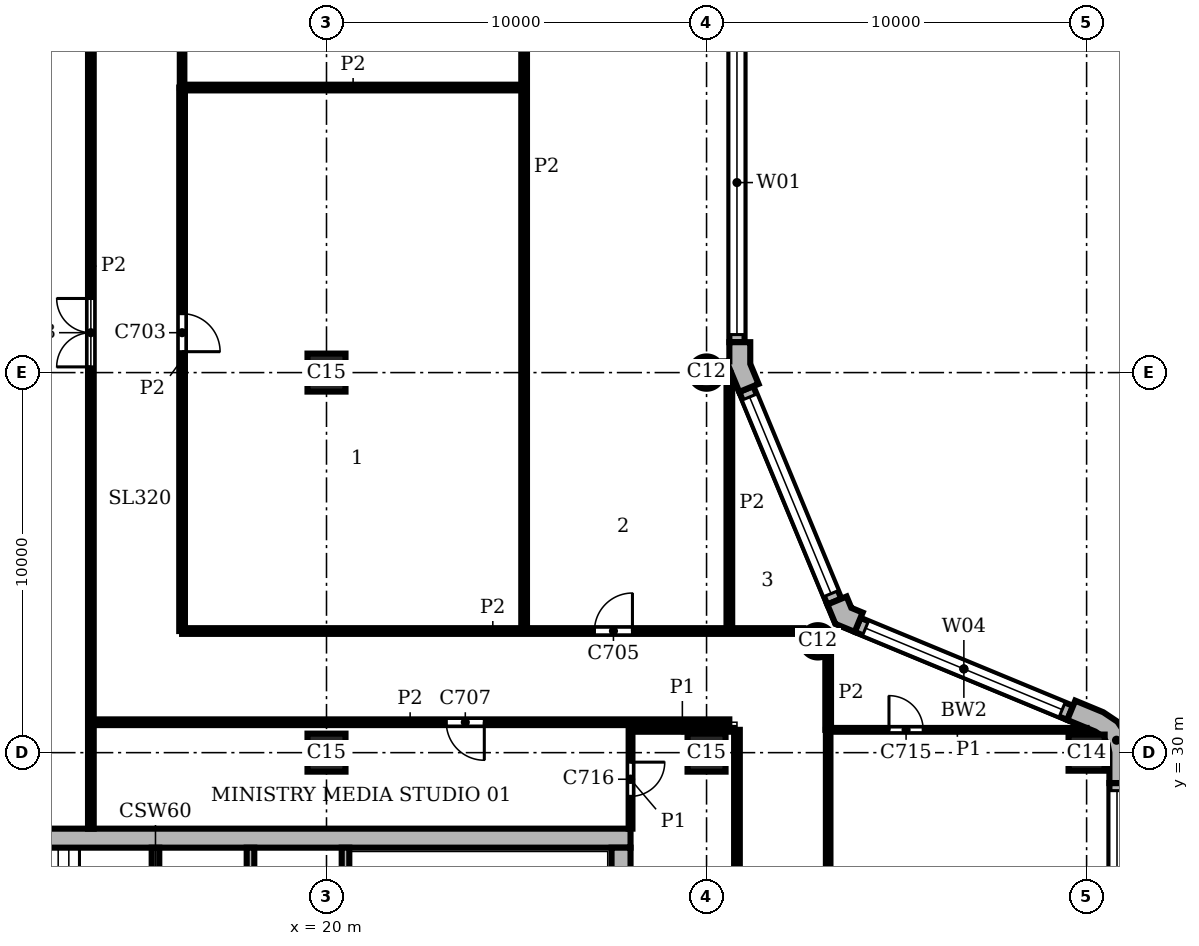
"""IFC4 building model, lengths in metres.
Left out: names, types, materials, properties, quantities, classifications, styles, units other than length and angle.
Written with IfcOpenShell. Run it as: python <this file> out.ifc"""

import sys

from ifc_helpers import new_model, si_unit, direction, frame, frame_2d, origin, origin_2d, place, context, subcontext, project, spatial, polyline, rectangle, circle, outline, extrude, element, fill, save


model = new_model("IFC4")
c1 = context("Model", 3, precision=1e-05, world=origin(), true_north=direction((0.0, 1.0)))
c2 = subcontext(c1, "Body", "Model", "MODEL_VIEW")
j1 = project(units=[si_unit("LENGTHUNIT", "METRE"), si_unit("PLANEANGLEUNIT", "RADIAN")], contexts=[c1])
p1 = place(None, origin())
s1 = spatial("IfcSite", under=j1, at=p1, CompositionType="ELEMENT")
p2 = place(p1, origin())
s2 = spatial("IfcBuilding", under=s1, at=p2, CompositionType="ELEMENT")
p3 = place(p2, frame((0.0, 0.0, 309.9)))
s3 = spatial("IfcBuildingStorey", under=s2, at=p3, CompositionType="ELEMENT", Elevation=309.9)
p4 = place(p3, frame((40.0, 30.0, 0.0), z_axis=(0.0, 0.0, 1.0), x_axis=(1.0, 0.0, 0.0)))
e1 = element("IfcColumn", 1, at=p4, inside=s3, PredefinedType="COLUMN", context=c2, shape_type="SweptSolid", body=[
    extrude(rectangle(XDim=0.95, YDim=0.95, at=origin_2d()), origin(), (0.0, 0.0, 1.0), 3.9),
])
for number, where, z_axis, x_axis in (
    (2, (32.929, 32.929, 0.0), (0.0, 0.0, 1.0), (1.0, 0.0, 0.0)),
    (3, (30.0, 40.0, 0.0), (0.0, 0.0, 1.0), (1.0, 0.0, 0.0)),
):
    element("IfcColumn", number, at=place(p3, frame(where, z_axis=z_axis, x_axis=x_axis)), inside=s3, PredefinedType="COLUMN", context=c2, shape_type="SweptSolid", body=[
        extrude(circle(Radius=0.425, at=origin_2d()), origin(), (0.0, 0.0, 1.0), 3.9),
    ])
for number, where, z_axis, x_axis in (
    (4, (20.0, 30.0, 0.0), (0.0, 0.0, 1.0), (1.0, 0.0, 0.0)),
    (5, (20.0, 40.0, 0.0), (0.0, 0.0, 1.0), (1.0, 0.0, 0.0)),
    (6, (30.0, 30.0, 0.0), (0.0, 0.0, 1.0), (1.0, 0.0, 0.0)),
):
    element("IfcColumn", number, at=place(p3, frame(where, z_axis=z_axis, x_axis=x_axis)), inside=s3, PredefinedType="COLUMN", context=c2, shape_type="SweptSolid", body=[
        extrude(rectangle(XDim=1.0, YDim=1.0, at=origin_2d()), origin(), (0.0, 0.0, 1.0), 3.9),
    ])
p5 = place(p3, frame((27.75, 8.5, 0.0), z_axis=(0.0, 0.0, 1.0), x_axis=(0.0, 1.0, 0.0)))
e7 = element("IfcWall", 7, at=p5, inside=s3, PredefinedType="SHEAR", context=c2, shape_type="SweptSolid", body=[
    extrude(rectangle(XDim=19.0, YDim=0.5, at=frame_2d((9.5, 0.0))), origin(), (0.0, 0.0, 1.0), 3.9),
])
p6 = place(p5, frame((4.95, 0.0, 0.0)))
e8 = element("IfcOpeningElement", 8, at=p6, cuts=e7, PredefinedType="OPENING", context=c2, shape_type="SweptSolid", body=[
    extrude(rectangle(XDim=1.6, YDim=2.1, at=frame_2d((0.8, 1.05))), frame((0.0, 0.26, 0.0), z_axis=(0.0, -1.0, 0.0), x_axis=(1.0, 0.0, 0.0)), (0.0, 0.0, 1.0), 0.52),
])
p7 = place(p3, frame((28.0, 27.75, 0.0), z_axis=(0.0, 0.0, 1.0), x_axis=(-1.0, 0.0, 0.0)))
e9 = element("IfcWall", 9, at=p7, inside=s3, PredefinedType="SHEAR", context=c2, shape_type="SweptSolid", body=[
    extrude(rectangle(XDim=20.0, YDim=0.5, at=frame_2d((10.0, 0.0))), origin(), (0.0, 0.0, 1.0), 3.9),
])
p8 = place(p3, origin())
e10 = element("IfcWall", 10, at=p8, inside=s3, PredefinedType="SOLIDWALL", context=c2, shape_type="SweptSolid", body=[
    extrude(outline(polyline([(41.0, 29.2), (41.15, 29.2), (41.15, 30.0), (41.062, 30.44), (40.813, 30.813), (40.44, 31.062), (39.701, 31.369), (39.644, 31.23), (39.49, 30.861), (40.229, 30.554), (40.424, 30.424), (40.554, 30.229), (40.6, 30.0), (40.6, 29.2), (41.0, 29.2)])), origin(), (0.0, 0.0, 1.0), 3.9),
])
e11 = element("IfcWall", 11, at=p8, inside=s3, PredefinedType="SOLIDWALL", context=c2, shape_type="SweptSolid", body=[
    extrude(outline(polyline([(34.051, 33.547), (34.108, 33.685), (33.809, 33.809), (33.685, 34.108), (33.547, 34.051), (33.177, 33.898), (33.388, 33.388), (33.898, 33.177), (34.051, 33.547)])), origin(), (0.0, 0.0, 1.0), 3.9),
])
e12 = element("IfcWall", 12, at=p8, inside=s3, PredefinedType="SOLIDWALL", context=c2, shape_type="SweptSolid", body=[
    extrude(outline(polyline([(30.62, 39.995), (30.62, 40.071), (30.861, 39.49), (31.23, 39.644), (31.369, 39.701), (31.15, 40.229), (31.15, 40.8), (31.0, 40.8), (30.6, 40.8), (30.6, 40.295), (30.425, 40.295), (30.425, 39.995), (30.62, 39.995)])), origin(), (0.0, 0.0, 1.0), 3.9),
])
p9 = place(p3, frame((40.8, 0.8, 0.0), z_axis=(0.0, 0.0, 1.0), x_axis=(0.0, 1.0, 0.0)))
e13 = element("IfcWall", 13, at=p9, inside=s3, PredefinedType="SOLIDWALL", context=c2, shape_type="SweptSolid", body=[
    extrude(rectangle(XDim=28.4, YDim=0.4, at=frame_2d((14.2, 0.0))), origin(), (0.0, 0.0, 1.0), 3.9),
])
p10 = place(p9, frame((0.2, 0.0, 0.9)))
e14 = element("IfcOpeningElement", 14, at=p10, cuts=e13, PredefinedType="OPENING", context=c2, shape_type="SweptSolid", body=[
    extrude(rectangle(XDim=8.0, YDim=2.35, at=frame_2d((4.0, 1.175))), frame((0.0, 0.21, 0.0), z_axis=(0.0, -1.0, 0.0), x_axis=(1.0, 0.0, 0.0)), (0.0, 0.0, 1.0), 0.42),
])
p11 = place(p9, frame((10.2, 0.0, 0.9)))
e15 = element("IfcOpeningElement", 15, at=p11, cuts=e13, PredefinedType="OPENING", context=c2, shape_type="SweptSolid", body=[
    extrude(rectangle(XDim=8.0, YDim=2.35, at=frame_2d((4.0, 1.175))), frame((0.0, 0.21, 0.0), z_axis=(0.0, -1.0, 0.0), x_axis=(1.0, 0.0, 0.0)), (0.0, 0.0, 1.0), 0.42),
])
p12 = place(p9, frame((20.2, 0.0, 0.9)))
e16 = element("IfcOpeningElement", 16, at=p12, cuts=e13, PredefinedType="OPENING", context=c2, shape_type="SweptSolid", body=[
    extrude(rectangle(XDim=8.0, YDim=2.35, at=frame_2d((4.0, 1.175))), frame((0.0, 0.21, 0.0), z_axis=(0.0, -1.0, 0.0), x_axis=(1.0, 0.0, 0.0)), (0.0, 0.0, 1.0), 0.42),
])
p13 = place(p3, frame((39.567, 31.045, 0.0), z_axis=(0.0, 0.0, 1.0), x_axis=(-0.923891000409, 0.382655745237, 0.0)))
e17 = element("IfcWall", 17, at=p13, inside=s3, PredefinedType="SOLIDWALL", context=c2, shape_type="SweptSolid", body=[
    extrude(rectangle(XDim=6.053, YDim=0.4, at=frame_2d((3.027, 0.0))), origin(), (0.0, 0.0, 1.0), 3.9),
])
p14 = place(p13, frame((0.227, 0.0, 0.9)))
e18 = element("IfcOpeningElement", 18, at=p14, cuts=e17, PredefinedType="OPENING", context=c2, shape_type="SweptSolid", body=[
    extrude(rectangle(XDim=5.6, YDim=2.35, at=frame_2d((2.8, 1.175))), frame((0.0, 0.21, 0.0), z_axis=(0.0, -1.0, 0.0), x_axis=(1.0, 0.0, 0.0)), (0.0, 0.0, 1.0), 0.42),
])
p15 = place(p3, frame((33.362, 33.974, 0.0), z_axis=(0.0, 0.0, 1.0), x_axis=(-0.382655745237, 0.923891000409, 0.0)))
e19 = element("IfcWall", 19, at=p15, inside=s3, PredefinedType="SOLIDWALL", context=c2, shape_type="SweptSolid", body=[
    extrude(rectangle(XDim=6.053, YDim=0.4, at=frame_2d((3.027, 0.0))), origin(), (0.0, 0.0, 1.0), 3.9),
])
p16 = place(p15, frame((0.227, 0.0, 0.9)))
e20 = element("IfcOpeningElement", 20, at=p16, cuts=e19, PredefinedType="OPENING", context=c2, shape_type="SweptSolid", body=[
    extrude(rectangle(XDim=5.6, YDim=2.35, at=frame_2d((2.8, 1.175))), frame((0.0, 0.21, 0.0), z_axis=(0.0, -1.0, 0.0), x_axis=(1.0, 0.0, 0.0)), (0.0, 0.0, 1.0), 0.42),
])
p17 = place(p3, frame((30.8, 40.8, 0.0), z_axis=(0.0, 0.0, 1.0), x_axis=(0.0, 1.0, 0.0)))
e21 = element("IfcWall", 21, at=p17, inside=s3, PredefinedType="SOLIDWALL", context=c2, shape_type="SweptSolid", body=[
    extrude(rectangle(XDim=18.4, YDim=0.4, at=frame_2d((9.2, 0.0))), origin(), (0.0, 0.0, 1.0), 3.9),
])
p18 = place(p17, frame((0.2, 0.0, 0.9)))
e22 = element("IfcOpeningElement", 22, at=p18, cuts=e21, PredefinedType="OPENING", context=c2, shape_type="SweptSolid", body=[
    extrude(rectangle(XDim=8.0, YDim=2.35, at=frame_2d((4.0, 1.175))), frame((0.0, 0.21, 0.0), z_axis=(0.0, -1.0, 0.0), x_axis=(1.0, 0.0, 0.0)), (0.0, 0.0, 1.0), 0.42),
])
p19 = place(p17, frame((10.2, 0.0, 0.9)))
e23 = element("IfcOpeningElement", 23, at=p19, cuts=e21, PredefinedType="OPENING", context=c2, shape_type="SweptSolid", body=[
    extrude(rectangle(XDim=8.0, YDim=2.35, at=frame_2d((4.0, 1.175))), frame((0.0, 0.21, 0.0), z_axis=(0.0, -1.0, 0.0), x_axis=(1.0, 0.0, 0.0)), (0.0, 0.0, 1.0), 0.42),
])
p20 = place(p3, frame((15.5, 23.6, 0.0), z_axis=(0.0, 0.0, 1.0), x_axis=(0.0, 1.0, 0.0)))
e24 = element("IfcWall", 24, at=p20, inside=s3, PredefinedType="SHEAR", context=c2, shape_type="SweptSolid", body=[
    extrude(rectangle(XDim=3.9, YDim=0.2, at=frame_2d((1.95, 0.0))), origin(), (0.0, 0.0, 1.0), 3.58),
])
p21 = place(p3, frame((18.0, 20.0, 0.0), z_axis=(0.0, 0.0, 1.0), x_axis=(0.0, 1.0, 0.0)))
e25 = element("IfcWall", 25, at=p21, inside=s3, PredefinedType="SHEAR", context=c2, shape_type="SweptSolid", body=[
    extrude(rectangle(XDim=7.5, YDim=0.2, at=frame_2d((3.75, 0.0))), origin(), (0.0, 0.0, 1.0), 3.58),
])
p22 = place(p21, frame((1.2, 0.0, 0.0)))
e26 = element("IfcOpeningElement", 26, at=p22, cuts=e25, PredefinedType="OPENING", context=c2, shape_type="SweptSolid", body=[
    extrude(rectangle(XDim=1.2, YDim=2.1, at=frame_2d((0.6, 1.05))), frame((0.0, 0.11, 0.0), z_axis=(0.0, -1.0, 0.0), x_axis=(1.0, 0.0, 0.0)), (0.0, 0.0, 1.0), 0.22),
])
p23 = place(p3, frame((20.5, 23.6, 0.0), z_axis=(0.0, 0.0, 1.0), x_axis=(0.0, 1.0, 0.0)))
e27 = element("IfcWall", 27, at=p23, inside=s3, PredefinedType="SHEAR", context=c2, shape_type="SweptSolid", body=[
    extrude(rectangle(XDim=3.9, YDim=0.2, at=frame_2d((1.95, 0.0))), origin(), (0.0, 0.0, 1.0), 3.58),
])
p24 = place(p3, frame((28.0, 28.0, 0.0), z_axis=(0.0, 0.0, 1.0), x_axis=(0.0, 1.0, 0.0)))
e28 = element("IfcWall", 28, at=p24, inside=s3, PredefinedType="PARTITIONING", context=c2, shape_type="SweptSolid", body=[
    extrude(rectangle(XDim=2.598, YDim=0.1, at=frame_2d((1.299, 0.0))), origin(), (0.0, 0.0, 1.0), 3.58),
])
p25 = place(p24, frame((0.85, 0.0, 0.0)))
e29 = element("IfcOpeningElement", 29, at=p25, cuts=e28, PredefinedType="OPENING", context=c2, shape_type="SweptSolid", body=[
    extrude(rectangle(XDim=0.9, YDim=2.1, at=frame_2d((0.45, 1.05))), frame((0.0, 0.06, 0.0), z_axis=(0.0, -1.0, 0.0), x_axis=(1.0, 0.0, 0.0)), (0.0, 0.0, 1.0), 0.12),
])
p26 = place(p3, frame((28.002, 30.6, 0.0), z_axis=(0.0, 0.0, 1.0), x_axis=(1.0, 0.0, 0.0)))
e30 = element("IfcWall", 30, at=p26, inside=s3, PredefinedType="PARTITIONING", context=c2, shape_type="SweptSolid", body=[
    extrude(rectangle(XDim=2.723, YDim=0.1, at=frame_2d((1.362, 0.0))), origin(), (0.0, 0.0, 1.0), 3.58),
])
p27 = place(p3, frame((33.2, 30.6, 0.0), z_axis=(0.0, 0.0, 1.0), x_axis=(1.0, 0.0, 0.0)))
e31 = element("IfcWall", 31, at=p27, inside=s3, PredefinedType="PARTITIONING", context=c2, shape_type="SweptSolid", body=[
    extrude(rectangle(XDim=6.799, YDim=0.1, at=frame_2d((3.399, 0.0))), origin(), (0.0, 0.0, 1.0), 3.58),
])
p28 = place(p27, frame((1.6, 0.0, 0.0)))
e32 = element("IfcOpeningElement", 32, at=p28, cuts=e31, PredefinedType="OPENING", context=c2, shape_type="SweptSolid", body=[
    extrude(rectangle(XDim=0.9, YDim=2.1, at=frame_2d((0.45, 1.05))), frame((0.0, 0.06, 0.0), z_axis=(0.0, -1.0, 0.0), x_axis=(1.0, 0.0, 0.0)), (0.0, 0.0, 1.0), 0.12),
])
p29 = place(p3, frame((13.8, 28.0, 0.0), z_axis=(0.0, 0.0, 1.0), x_axis=(0.0, 1.0, 0.0)))
e33 = element("IfcWall", 33, at=p29, inside=s3, PredefinedType="PARTITIONING", context=c2, shape_type="SweptSolid", body=[
    extrude(rectangle(XDim=29.6, YDim=0.15, at=frame_2d((14.8, 0.0))), origin(), (0.0, 0.0, 1.0), 3.58),
])
p30 = place(p29, frame((12.15, 0.0, 0.0)))
e34 = element("IfcOpeningElement", 34, at=p30, cuts=e33, PredefinedType="OPENING", context=c2, shape_type="SweptSolid", body=[
    extrude(rectangle(XDim=1.8, YDim=2.1, at=frame_2d((0.9, 1.05))), frame((0.0, 0.085, 0.0), z_axis=(0.0, -1.0, 0.0), x_axis=(1.0, 0.0, 0.0)), (0.0, 0.0, 1.0), 0.17),
])
p31 = place(p3, frame((16.2, 33.2, 0.0), z_axis=(0.0, 0.0, 1.0), x_axis=(0.0, 1.0, 0.0)))
e35 = element("IfcWall", 35, at=p31, inside=s3, PredefinedType="PARTITIONING", context=c2, shape_type="SweptSolid", body=[
    extrude(rectangle(XDim=14.3, YDim=0.15, at=frame_2d((7.15, 0.0))), origin(), (0.0, 0.0, 1.0), 3.58),
])
p32 = place(p31, frame((7.35, 0.0, 0.0)))
e36 = element("IfcOpeningElement", 36, at=p32, cuts=e35, PredefinedType="OPENING", context=c2, shape_type="SweptSolid", body=[
    extrude(rectangle(XDim=1.0, YDim=2.1, at=frame_2d((0.5, 1.05))), frame((0.0, 0.085, 0.0), z_axis=(0.0, -1.0, 0.0), x_axis=(1.0, 0.0, 0.0)), (0.0, 0.0, 1.0), 0.17),
])
p33 = place(p3, frame((25.2, 33.2, 0.0), z_axis=(0.0, 0.0, 1.0), x_axis=(0.0, 1.0, 0.0)))
e37 = element("IfcWall", 37, at=p33, inside=s3, PredefinedType="PARTITIONING", context=c2, shape_type="SweptSolid", body=[
    extrude(rectangle(XDim=24.4, YDim=0.15, at=frame_2d((12.2, 0.0))), origin(), (0.0, 0.0, 1.0), 3.58),
])
p34 = place(p3, frame((30.6, 33.2, 0.0), z_axis=(0.0, 0.0, 1.0), x_axis=(0.0, 1.0, 0.0)))
e38 = element("IfcWall", 38, at=p34, inside=s3, PredefinedType="PARTITIONING", context=c2, shape_type="SweptSolid", body=[
    extrude(rectangle(XDim=6.738, YDim=0.15, at=frame_2d((3.369, 0.0))), origin(), (0.0, 0.0, 1.0), 3.58),
])
p35 = place(p3, frame((30.8, 15.45, 0.0), z_axis=(0.0, 0.0, 1.0), x_axis=(0.0, 1.0, 0.0)))
e39 = element("IfcWall", 39, at=p35, inside=s3, PredefinedType="PARTITIONING", context=c2, shape_type="SweptSolid", body=[
    extrude(rectangle(XDim=15.15, YDim=0.15, at=frame_2d((7.575, 0.0))), origin(), (0.0, 0.0, 1.0), 3.58),
])
p36 = place(p35, frame((5.35, 0.0, 0.0)))
e40 = element("IfcOpeningElement", 40, at=p36, cuts=e39, PredefinedType="OPENING", context=c2, shape_type="SweptSolid", body=[
    extrude(rectangle(XDim=1.0, YDim=2.1, at=frame_2d((0.5, 1.05))), frame((0.0, 0.085, 0.0), z_axis=(0.0, -1.0, 0.0), x_axis=(1.0, 0.0, 0.0)), (0.0, 0.0, 1.0), 0.17),
])
p37 = place(p3, frame((33.2, 30.6, 0.0), z_axis=(0.0, 0.0, 1.0), x_axis=(0.0, 1.0, 0.0)))
e41 = element("IfcWall", 41, at=p37, inside=s3, PredefinedType="PARTITIONING", context=c2, shape_type="SweptSolid", body=[
    extrude(rectangle(XDim=1.952, YDim=0.15, at=frame_2d((0.976, 0.0))), origin(), (0.0, 0.0, 1.0), 3.58),
])
p38 = place(p3, frame((13.802, 30.8, 0.0), z_axis=(0.0, 0.0, 1.0), x_axis=(1.0, 0.0, 0.0)))
e42 = element("IfcWall", 42, at=p38, inside=s3, PredefinedType="PARTITIONING", context=c2, shape_type="SweptSolid", body=[
    extrude(rectangle(XDim=16.797, YDim=0.15, at=frame_2d((8.398, 0.0))), origin(), (0.0, 0.0, 1.0), 3.58),
])
p39 = place(p38, frame((9.35, 0.0, 0.0)))
e43 = element("IfcOpeningElement", 43, at=p39, cuts=e42, PredefinedType="OPENING", context=c2, shape_type="SweptSolid", body=[
    extrude(rectangle(XDim=1.0, YDim=2.1, at=frame_2d((0.5, 1.05))), frame((0.0, 0.085, 0.0), z_axis=(0.0, -1.0, 0.0), x_axis=(1.0, 0.0, 0.0)), (0.0, 0.0, 1.0), 0.17),
])
p40 = place(p3, frame((16.2, 33.2, 0.0), z_axis=(0.0, 0.0, 1.0), x_axis=(1.0, 0.0, 0.0)))
e44 = element("IfcWall", 44, at=p40, inside=s3, PredefinedType="PARTITIONING", context=c2, shape_type="SweptSolid", body=[
    extrude(rectangle(XDim=16.352, YDim=0.15, at=frame_2d((8.176, 0.0))), origin(), (0.0, 0.0, 1.0), 3.58),
])
p41 = place(p40, frame((10.85, 0.0, 0.0)))
e45 = element("IfcOpeningElement", 45, at=p41, cuts=e44, PredefinedType="OPENING", context=c2, shape_type="SweptSolid", body=[
    extrude(rectangle(XDim=1.0, YDim=2.1, at=frame_2d((0.5, 1.05))), frame((0.0, 0.085, 0.0), z_axis=(0.0, -1.0, 0.0), x_axis=(1.0, 0.0, 0.0)), (0.0, 0.0, 1.0), 0.17),
])
p42 = place(p3, frame((16.2, 47.5, 0.0), z_axis=(0.0, 0.0, 1.0), x_axis=(1.0, 0.0, 0.0)))
e46 = element("IfcWall", 46, at=p42, inside=s3, PredefinedType="PARTITIONING", context=c2, shape_type="SweptSolid", body=[
    extrude(rectangle(XDim=9.0, YDim=0.15, at=frame_2d((4.5, 0.0))), origin(), (0.0, 0.0, 1.0), 3.58),
])
p43 = place(p3, frame((16.2, 47.5, 0.0), z_axis=(0.0, 0.0, 1.0), x_axis=(0.0, 1.0, 0.0)))
e47 = element("IfcWall", 47, at=p43, inside=s3, PredefinedType="PARTITIONING", context=c2, shape_type="SweptSolid", body=[
    extrude(rectangle(XDim=10.1, YDim=0.12, at=frame_2d((5.05, 0.0))), origin(), (0.0, 0.0, 1.0), 3.58),
])
p44 = place(p43, frame((3.35, 0.0, 0.0)))
e48 = element("IfcOpeningElement", 48, at=p44, cuts=e47, PredefinedType="OPENING", context=c2, shape_type="SweptSolid", body=[
    extrude(rectangle(XDim=1.8, YDim=2.1, at=frame_2d((0.9, 1.05))), frame((0.0, 0.07, 0.0), z_axis=(0.0, -1.0, 0.0), x_axis=(1.0, 0.0, 0.0)), (0.0, 0.0, 1.0), 0.14),
])
p45 = place(p3, frame((33.2, 8.0, 0.0), z_axis=(0.0, 0.0, 1.0), x_axis=(0.0, 1.0, 0.0)))
e49 = element("IfcWall", 49, at=p45, inside=s3, PredefinedType="PARTITIONING", context=c2, shape_type="SweptSolid", body=[
    extrude(rectangle(XDim=22.6, YDim=0.12, at=frame_2d((11.3, 0.0))), origin(), (0.0, 0.0, 1.0), 3.58),
])
p46 = place(p45, frame((8.6, 0.0, 0.0)))
e50 = element("IfcOpeningElement", 50, at=p46, cuts=e49, PredefinedType="OPENING", context=c2, shape_type="SweptSolid", body=[
    extrude(rectangle(XDim=1.8, YDim=2.1, at=frame_2d((0.9, 1.05))), frame((0.0, 0.07, 0.0), z_axis=(0.0, -1.0, 0.0), x_axis=(1.0, 0.0, 0.0)), (0.0, 0.0, 1.0), 0.14),
])
p47 = place(p12, origin())
e51 = element("IfcWindow", 51, at=p47, inside=s3, PartitioningType="SINGLE_PANEL", PredefinedType="WINDOW", context=c2, shape_type="SweptSolid", body=[
    extrude(rectangle(XDim=8.0, YDim=2.35, at=frame_2d((4.0, 1.175))), frame((0.0, 0.16, 0.0), z_axis=(0.0, -1.0, 0.0), x_axis=(1.0, 0.0, 0.0)), (0.0, 0.0, 1.0), 0.06),
])
fill(e16, e51)
p48 = place(p14, origin())
e52 = element("IfcWindow", 52, at=p48, inside=s3, PartitioningType="SINGLE_PANEL", PredefinedType="WINDOW", context=c2, shape_type="SweptSolid", body=[
    extrude(rectangle(XDim=5.6, YDim=2.35, at=frame_2d((2.8, 1.175))), frame((0.0, 0.16, 0.0), z_axis=(0.0, -1.0, 0.0), x_axis=(1.0, 0.0, 0.0)), (0.0, 0.0, 1.0), 0.06),
])
fill(e18, e52)
p49 = place(p16, origin())
e53 = element("IfcWindow", 53, at=p49, inside=s3, PartitioningType="SINGLE_PANEL", PredefinedType="WINDOW", context=c2, shape_type="SweptSolid", body=[
    extrude(rectangle(XDim=5.6, YDim=2.35, at=frame_2d((2.8, 1.175))), frame((0.0, 0.16, 0.0), z_axis=(0.0, -1.0, 0.0), x_axis=(1.0, 0.0, 0.0)), (0.0, 0.0, 1.0), 0.06),
])
fill(e20, e53)
p50 = place(p18, origin())
e54 = element("IfcWindow", 54, at=p50, inside=s3, PartitioningType="SINGLE_PANEL", PredefinedType="WINDOW", context=c2, shape_type="SweptSolid", body=[
    extrude(rectangle(XDim=8.0, YDim=2.35, at=frame_2d((4.0, 1.175))), frame((0.0, 0.16, 0.0), z_axis=(0.0, -1.0, 0.0), x_axis=(1.0, 0.0, 0.0)), (0.0, 0.0, 1.0), 0.06),
])
fill(e22, e54)
p51 = place(p32, frame((1.0, 0.0, 0.0), z_axis=(0.0, 0.0, 1.0), x_axis=(-1.0, 0.0, 0.0)))
e55 = element("IfcDoor", 55, at=p51, inside=s3, OperationType="SINGLE_SWING_RIGHT", PredefinedType="DOOR", context=c2, shape_type="SweptSolid", body=[
    extrude(rectangle(XDim=1.0, YDim=2.1, at=frame_2d((0.5, 1.05))), frame((0.0, 0.025, 0.0), z_axis=(0.0, -1.0, 0.0), x_axis=(1.0, 0.0, 0.0)), (0.0, 0.0, 1.0), 0.05),
])
fill(e36, e55)
p52 = place(p41, origin())
e56 = element("IfcDoor", 56, at=p52, inside=s3, OperationType="SINGLE_SWING_RIGHT", PredefinedType="DOOR", context=c2, shape_type="SweptSolid", body=[
    extrude(rectangle(XDim=1.0, YDim=2.1, at=frame_2d((0.5, 1.05))), frame((0.0, 0.025, 0.0), z_axis=(0.0, -1.0, 0.0), x_axis=(1.0, 0.0, 0.0)), (0.0, 0.0, 1.0), 0.05),
])
fill(e45, e56)
p53 = place(p39, frame((1.0, 0.0, 0.0), z_axis=(0.0, 0.0, 1.0), x_axis=(-1.0, 0.0, 0.0)))
e57 = element("IfcDoor", 57, at=p53, inside=s3, OperationType="SINGLE_SWING_LEFT", PredefinedType="DOOR", context=c2, shape_type="SweptSolid", body=[
    extrude(rectangle(XDim=1.0, YDim=2.1, at=frame_2d((0.5, 1.05))), frame((0.0, 0.025, 0.0), z_axis=(0.0, -1.0, 0.0), x_axis=(1.0, 0.0, 0.0)), (0.0, 0.0, 1.0), 0.05),
])
fill(e43, e57)
p54 = place(p30, origin())
e58 = element("IfcDoor", 58, at=p54, inside=s3, OperationType="DOUBLE_DOOR_SINGLE_SWING", PredefinedType="DOOR", context=c2, shape_type="SweptSolid", body=[
    extrude(rectangle(XDim=1.8, YDim=2.1, at=frame_2d((0.9, 1.05))), frame((0.0, 0.025, 0.0), z_axis=(0.0, -1.0, 0.0), x_axis=(1.0, 0.0, 0.0)), (0.0, 0.0, 1.0), 0.05),
])
fill(e34, e58)
p55 = place(p28, origin())
e59 = element("IfcDoor", 59, at=p55, inside=s3, OperationType="SINGLE_SWING_LEFT", PredefinedType="DOOR", context=c2, shape_type="SweptSolid", body=[
    extrude(rectangle(XDim=0.9, YDim=2.1, at=frame_2d((0.45, 1.05))), frame((0.0, 0.025, 0.0), z_axis=(0.0, -1.0, 0.0), x_axis=(1.0, 0.0, 0.0)), (0.0, 0.0, 1.0), 0.05),
])
fill(e32, e59)
p56 = place(p25, frame((0.9, 0.0, 0.0), z_axis=(0.0, 0.0, 1.0), x_axis=(-1.0, 0.0, 0.0)))
e60 = element("IfcDoor", 60, at=p56, inside=s3, OperationType="SINGLE_SWING_LEFT", PredefinedType="DOOR", context=c2, shape_type="SweptSolid", body=[
    extrude(rectangle(XDim=0.9, YDim=2.1, at=frame_2d((0.45, 1.05))), frame((0.0, 0.025, 0.0), z_axis=(0.0, -1.0, 0.0), x_axis=(1.0, 0.0, 0.0)), (0.0, 0.0, 1.0), 0.05),
])
fill(e29, e60)
save(model, sys.argv[1])
